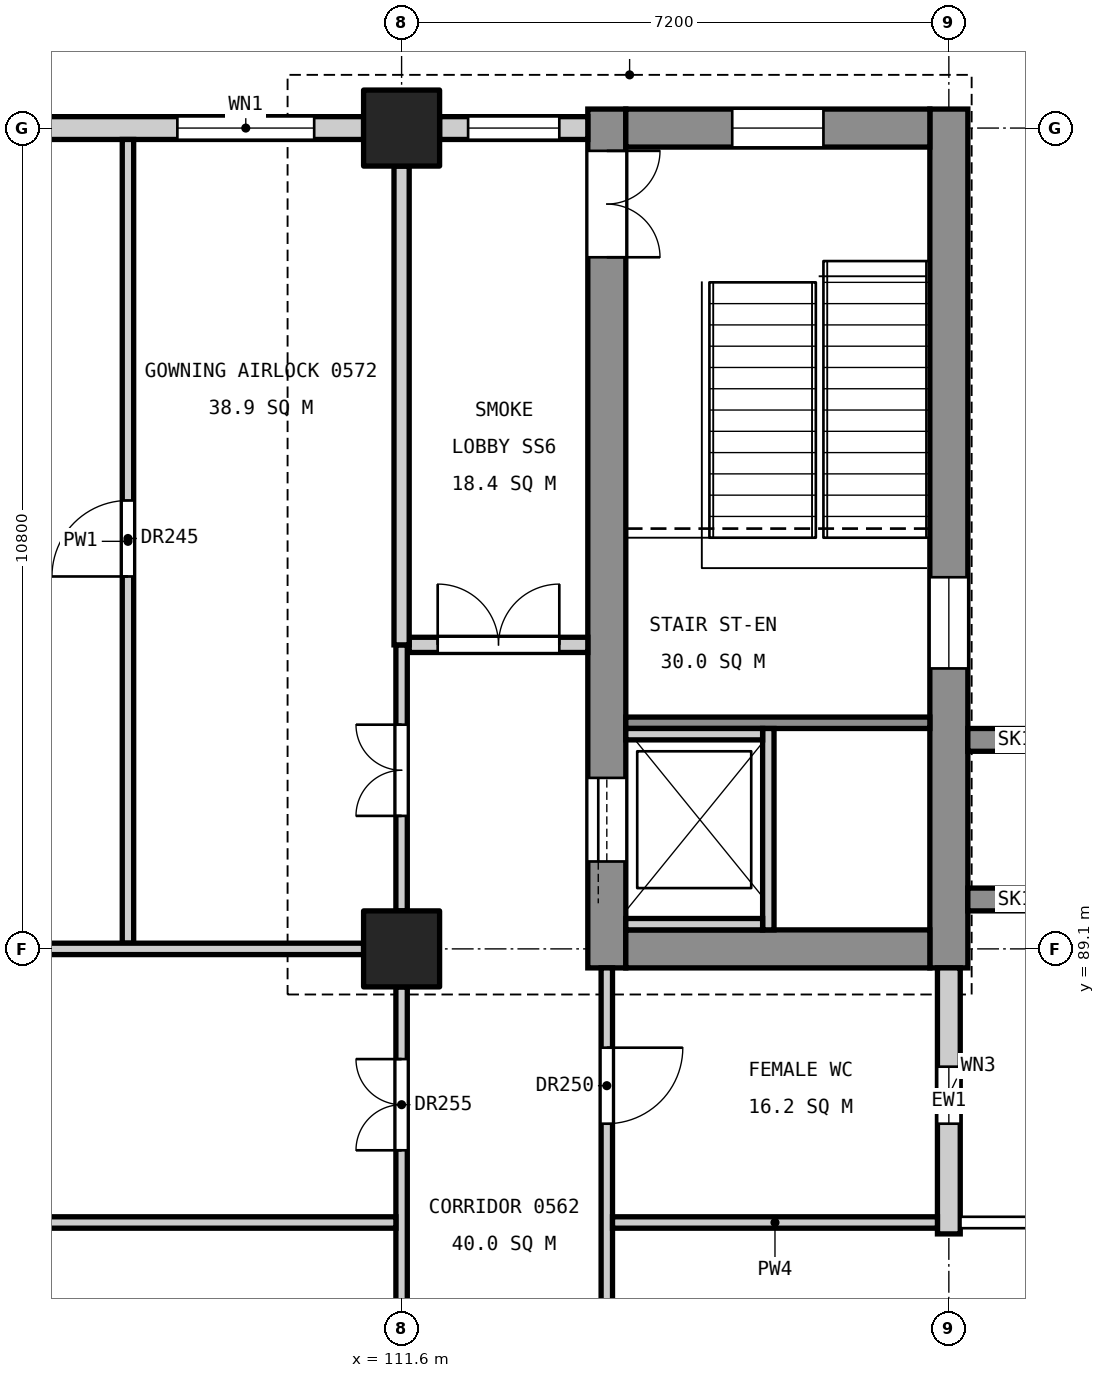
"""IFC4 building model, lengths in metres.
Left out: names, types, materials, properties, quantities, classifications, styles, units other than length and angle.
Written with IfcOpenShell. Run it as: python <this file> out.ifc"""

import sys

from ifc_helpers import new_model, si_unit, direction, frame, frame_2d, origin, origin_2d, place, context, subcontext, project, spatial, rectangle, extrude, element, fill, save


model = new_model("IFC4")
c1 = context("Model", 3, precision=1e-05, world=origin(), true_north=direction((0.0, 1.0)))
c2 = subcontext(c1, "Body", "Model", "MODEL_VIEW")
j1 = project(units=[si_unit("LENGTHUNIT", "METRE"), si_unit("PLANEANGLEUNIT", "RADIAN")], contexts=[c1])
p1 = place(None, origin())
s1 = spatial("IfcSite", under=j1, at=p1, CompositionType="ELEMENT")
p2 = place(p1, origin())
s2 = spatial("IfcBuilding", under=s1, at=p2, CompositionType="ELEMENT")
p3 = place(p2, frame((0.0, 0.0, 27.0)))
s3 = spatial("IfcBuildingStorey", under=s2, at=p3, CompositionType="ELEMENT", Elevation=27.0)
for number, where, z_axis, x_axis in (
    (1, (111.6, 89.1, 0.0), (0.0, 0.0, 1.0), (1.0, 0.0, 0.0)),
    (2, (111.6, 99.9, 0.0), (0.0, 0.0, 1.0), (1.0, 0.0, 0.0)),
):
    element("IfcColumn", number, at=place(p3, frame(where, z_axis=z_axis, x_axis=x_axis)), inside=s3, PredefinedType="COLUMN", context=c2, shape_type="SweptSolid", body=[
        extrude(rectangle(XDim=1.0, YDim=1.0, at=origin_2d()), origin(), (0.0, 0.0, 1.0), 4.8),
    ])
p4 = place(p3, frame((118.8, 88.85, 0.0), z_axis=(0.0, 0.0, 1.0), x_axis=(0.0, 1.0, 0.0)))
e3 = element("IfcWall", 3, at=p4, inside=s3, PredefinedType="SHEAR", context=c2, shape_type="SweptSolid", body=[
    extrude(rectangle(XDim=11.3, YDim=0.5, at=frame_2d((5.65, 0.0))), origin(), (0.0, 0.0, 1.0), 4.55),
])
p5 = place(p4, frame((3.94, 0.0, 3.4)))
e4 = element("IfcOpeningElement", 4, at=p5, cuts=e3, PredefinedType="OPENING", context=c2, shape_type="SweptSolid", body=[
    extrude(rectangle(XDim=1.2, YDim=0.9, at=frame_2d((0.6, 0.45))), frame((0.0, 0.26, 0.0), z_axis=(0.0, -1.0, 0.0), x_axis=(1.0, 0.0, 0.0)), (0.0, 0.0, 1.0), 0.52),
])
p6 = place(p3, frame((114.3, 88.85, 0.0), z_axis=(0.0, 0.0, 1.0), x_axis=(0.0, 1.0, 0.0)))
e5 = element("IfcWall", 5, at=p6, inside=s3, PredefinedType="SHEAR", context=c2, shape_type="SweptSolid", body=[
    extrude(rectangle(XDim=11.3, YDim=0.5, at=frame_2d((5.65, 0.0))), origin(), (0.0, 0.0, 1.0), 4.55),
])
p7 = place(p6, frame((9.35, 0.0, 0.0)))
e6 = element("IfcOpeningElement", 6, at=p7, cuts=e5, PredefinedType="OPENING", context=c2, shape_type="SweptSolid", body=[
    extrude(rectangle(XDim=1.4, YDim=2.1, at=frame_2d((0.7, 1.05))), frame((0.0, 0.26, 0.0), z_axis=(0.0, -1.0, 0.0), x_axis=(1.0, 0.0, 0.0)), (0.0, 0.0, 1.0), 0.52),
])
p8 = place(p6, frame((1.4, 0.0, 0.0)))
e7 = element("IfcOpeningElement", 7, at=p8, cuts=e5, PredefinedType="OPENING", context=c2, shape_type="SweptSolid", body=[
    extrude(rectangle(XDim=1.1, YDim=2.1, at=frame_2d((0.55, 1.05))), frame((0.0, 0.26, 0.0), z_axis=(0.0, -1.0, 0.0), x_axis=(1.0, 0.0, 0.0)), (0.0, 0.0, 1.0), 0.52),
])
p9 = place(p3, frame((118.55, 89.1, 0.0), z_axis=(0.0, 0.0, 1.0), x_axis=(-1.0, 0.0, 0.0)))
e8 = element("IfcWall", 8, at=p9, inside=s3, PredefinedType="SHEAR", context=c2, shape_type="SweptSolid", body=[
    extrude(rectangle(XDim=4.0, YDim=0.5, at=frame_2d((2.0, 0.0))), origin(), (0.0, 0.0, 1.0), 4.55),
])
p10 = place(p3, frame((118.55, 99.9, 0.0), z_axis=(0.0, 0.0, 1.0), x_axis=(-1.0, 0.0, 0.0)))
e9 = element("IfcWall", 9, at=p10, inside=s3, PredefinedType="SHEAR", context=c2, shape_type="SweptSolid", body=[
    extrude(rectangle(XDim=4.0, YDim=0.5, at=frame_2d((2.0, 0.0))), origin(), (0.0, 0.0, 1.0), 4.55),
])
p11 = place(p10, frame((1.4, 0.0, 3.4)))
e10 = element("IfcOpeningElement", 10, at=p11, cuts=e9, PredefinedType="OPENING", context=c2, shape_type="SweptSolid", body=[
    extrude(rectangle(XDim=1.2, YDim=0.9, at=frame_2d((0.6, 0.45))), frame((0.0, 0.26, 0.0), z_axis=(0.0, -1.0, 0.0), x_axis=(1.0, 0.0, 0.0)), (0.0, 0.0, 1.0), 0.52),
])
for number, where, z_axis, x_axis in (
    (11, (119.05, 89.75, 0.0), (0.0, 0.0, 1.0), (1.0, 0.0, 0.0)),
    (12, (119.05, 91.85, 0.0), (0.0, 0.0, 1.0), (1.0, 0.0, 0.0)),
):
    element("IfcWall", number, at=place(p3, frame(where, z_axis=z_axis, x_axis=x_axis)), inside=s3, PredefinedType="SHEAR", context=c2, shape_type="SweptSolid", body=[
        extrude(rectangle(XDim=1.25, YDim=0.3, at=frame_2d((0.625, 0.0))), origin(), (0.0, 0.0, 1.0), 4.8),
    ])
p12 = place(p3, frame((118.55, 92.075, 0.0), z_axis=(0.0, 0.0, 1.0), x_axis=(-1.0, 0.0, 0.0)))
e13 = element("IfcWall", 13, at=p12, inside=s3, PredefinedType="SOLIDWALL", context=c2, shape_type="SweptSolid", body=[
    extrude(rectangle(XDim=4.0, YDim=0.15, at=frame_2d((2.0, 0.0))), origin(), (0.0, 0.0, 1.0), 4.55),
])
p13 = place(p3, frame((116.425, 92.0, 0.0), z_axis=(0.0, 0.0, 1.0), x_axis=(0.0, -1.0, 0.0)))
e14 = element("IfcWall", 14, at=p13, inside=s3, PredefinedType="SOLIDWALL", context=c2, shape_type="SweptSolid", body=[
    extrude(rectangle(XDim=2.65, YDim=0.15, at=frame_2d((1.325, 0.0))), origin(), (0.0, 0.0, 1.0), 4.8),
])
for number, where, z_axis, x_axis in (
    (15, (116.35, 91.925, 0.0), (0.0, 0.0, 1.0), (-1.0, 0.0, 0.0)),
    (16, (116.35, 89.425, 0.0), (0.0, 0.0, 1.0), (-1.0, 0.0, 0.0)),
):
    element("IfcWall", number, at=place(p3, frame(where, z_axis=z_axis, x_axis=x_axis)), inside=s3, PredefinedType="SOLIDWALL", context=c2, shape_type="SweptSolid", body=[
        extrude(rectangle(XDim=1.8, YDim=0.15, at=frame_2d((0.9, 0.0))), origin(), (0.0, 0.0, 1.0), 4.8),
    ])
p14 = place(p3, frame((118.8, 85.35, 0.0), z_axis=(0.0, 0.0, 1.0), x_axis=(0.0, 1.0, 0.0)))
e17 = element("IfcWall", 17, at=p14, inside=s3, PredefinedType="STANDARD", context=c2, shape_type="SweptSolid", body=[
    extrude(rectangle(XDim=3.5, YDim=0.3, at=frame_2d((1.75, 0.0))), origin(), (0.0, 0.0, 1.0), 3.65),
])
p15 = place(p14, frame((1.45, 0.0, 0.8)))
e18 = element("IfcOpeningElement", 18, at=p15, cuts=e17, PredefinedType="OPENING", context=c2, shape_type="SweptSolid", body=[
    extrude(rectangle(XDim=0.75, YDim=1.2, at=frame_2d((0.375, 0.6))), frame((0.0, 0.16, 0.0), z_axis=(0.0, -1.0, 0.0), x_axis=(1.0, 0.0, 0.0)), (0.0, 0.0, 1.0), 0.32),
])
p16 = place(p3, frame((114.05, 99.9, 0.0), z_axis=(0.0, 0.0, 1.0), x_axis=(-1.0, 0.0, 0.0)))
e19 = element("IfcWall", 19, at=p16, inside=s3, PredefinedType="STANDARD", context=c2, shape_type="SweptSolid", body=[
    extrude(rectangle(XDim=1.95, YDim=0.3, at=frame_2d((0.975, 0.0))), origin(), (0.0, 0.0, 1.0), 3.85),
])
p17 = place(p16, frame((0.375, 0.0, 0.9)))
e20 = element("IfcOpeningElement", 20, at=p17, cuts=e19, PredefinedType="OPENING", context=c2, shape_type="SweptSolid", body=[
    extrude(rectangle(XDim=1.2, YDim=2.4, at=frame_2d((0.6, 1.2))), frame((0.0, 0.16, 0.0), z_axis=(0.0, -1.0, 0.0), x_axis=(1.0, 0.0, 0.0)), (0.0, 0.0, 1.0), 0.32),
])
p18 = place(p3, frame((111.1, 99.9, 0.0), z_axis=(0.0, 0.0, 1.0), x_axis=(-1.0, 0.0, 0.0)))
e21 = element("IfcWall", 21, at=p18, inside=s3, PredefinedType="STANDARD", context=c2, shape_type="SweptSolid", body=[
    extrude(rectangle(XDim=9.8, YDim=0.3, at=frame_2d((4.9, 0.0))), origin(), (0.0, 0.0, 1.0), 3.85),
])
p19 = place(p18, frame((0.65, 0.0, 0.9)))
e22 = element("IfcOpeningElement", 22, at=p19, cuts=e21, PredefinedType="OPENING", context=c2, shape_type="SweptSolid", body=[
    extrude(rectangle(XDim=1.8, YDim=2.4, at=frame_2d((0.9, 1.2))), frame((0.0, 0.16, 0.0), z_axis=(0.0, -1.0, 0.0), x_axis=(1.0, 0.0, 0.0)), (0.0, 0.0, 1.0), 0.32),
])
p20 = place(p18, frame((4.525, 0.0, 0.8)))
e23 = element("IfcOpeningElement", 23, at=p20, cuts=e21, PredefinedType="OPENING", context=c2, shape_type="SweptSolid", body=[
    extrude(rectangle(XDim=0.75, YDim=1.2, at=frame_2d((0.375, 0.6))), frame((0.0, 0.16, 0.0), z_axis=(0.0, -1.0, 0.0), x_axis=(1.0, 0.0, 0.0)), (0.0, 0.0, 1.0), 0.32),
])
p21 = place(p18, frame((7.35, 0.0, 0.9)))
e24 = element("IfcOpeningElement", 24, at=p21, cuts=e21, PredefinedType="OPENING", context=c2, shape_type="SweptSolid", body=[
    extrude(rectangle(XDim=1.8, YDim=2.4, at=frame_2d((0.9, 1.2))), frame((0.0, 0.16, 0.0), z_axis=(0.0, -1.0, 0.0), x_axis=(1.0, 0.0, 0.0)), (0.0, 0.0, 1.0), 0.32),
])
p22 = place(p3, frame((114.3, 78.45, 0.0), z_axis=(0.0, 0.0, 1.0), x_axis=(0.0, 1.0, 0.0)))
e25 = element("IfcWall", 25, at=p22, inside=s3, PredefinedType="PARTITIONING", context=c2, shape_type="SweptSolid", body=[
    extrude(rectangle(XDim=10.4, YDim=0.15, at=frame_2d((5.2, 0.0))), origin(), (0.0, 0.0, 1.0), 3.55),
])
p23 = place(p22, frame((8.35, 0.0, 0.0)))
e26 = element("IfcOpeningElement", 26, at=p23, cuts=e25, PredefinedType="OPENING", context=c2, shape_type="SweptSolid", body=[
    extrude(rectangle(XDim=1.0, YDim=2.1, at=frame_2d((0.5, 1.05))), frame((0.0, 0.085, 0.0), z_axis=(0.0, -1.0, 0.0), x_axis=(1.0, 0.0, 0.0)), (0.0, 0.0, 1.0), 0.17),
])
p24 = place(p22, frame((2.95, 0.0, 0.0)))
e27 = element("IfcOpeningElement", 27, at=p24, cuts=e25, PredefinedType="OPENING", context=c2, shape_type="SweptSolid", body=[
    extrude(rectangle(XDim=1.0, YDim=2.1, at=frame_2d((0.5, 1.05))), frame((0.0, 0.085, 0.0), z_axis=(0.0, -1.0, 0.0), x_axis=(1.0, 0.0, 0.0)), (0.0, 0.0, 1.0), 0.17),
])
p25 = place(p3, frame((118.65, 85.5, 0.0), z_axis=(0.0, 0.0, 1.0), x_axis=(-1.0, 0.0, 0.0)))
e28 = element("IfcWall", 28, at=p25, inside=s3, PredefinedType="PARTITIONING", context=c2, shape_type="SweptSolid", body=[
    extrude(rectangle(XDim=4.275, YDim=0.15, at=frame_2d((2.137, 0.0))), origin(), (0.0, 0.0, 1.0), 3.85),
])
p26 = place(p3, frame((114.05, 93.1, 0.0), z_axis=(0.0, 0.0, 1.0), x_axis=(-1.0, 0.0, 0.0)))
e29 = element("IfcWall", 29, at=p26, inside=s3, PredefinedType="PARTITIONING", context=c2, shape_type="SweptSolid", body=[
    extrude(rectangle(XDim=2.35, YDim=0.2, at=frame_2d((1.175, 0.0))), origin(), (0.0, 0.0, 1.0), 3.55),
])
p27 = place(p26, frame((0.375, 0.0, 0.0)))
e30 = element("IfcOpeningElement", 30, at=p27, cuts=e29, PredefinedType="OPENING", context=c2, shape_type="SweptSolid", body=[
    extrude(rectangle(XDim=1.6, YDim=2.1, at=frame_2d((0.8, 1.05))), frame((0.0, 0.11, 0.0), z_axis=(0.0, -1.0, 0.0), x_axis=(1.0, 0.0, 0.0)), (0.0, 0.0, 1.0), 0.22),
])
p28 = place(p3, frame((111.6, 78.8, 0.0), z_axis=(0.0, 0.0, 1.0), x_axis=(0.0, 1.0, 0.0)))
e31 = element("IfcWall", 31, at=p28, inside=s3, PredefinedType="PARTITIONING", context=c2, shape_type="SweptSolid", body=[
    extrude(rectangle(XDim=9.8, YDim=0.15, at=frame_2d((4.9, 0.0))), origin(), (0.0, 0.0, 1.0), 3.55),
])
p29 = place(p28, frame((4.3, 0.0, 0.0)))
e32 = element("IfcOpeningElement", 32, at=p29, cuts=e31, PredefinedType="OPENING", context=c2, shape_type="SweptSolid", body=[
    extrude(rectangle(XDim=1.2, YDim=2.1, at=frame_2d((0.6, 1.05))), frame((0.0, 0.085, 0.0), z_axis=(0.0, -1.0, 0.0), x_axis=(1.0, 0.0, 0.0)), (0.0, 0.0, 1.0), 0.17),
])
p30 = place(p28, frame((0.95, 0.0, 0.0)))
e33 = element("IfcOpeningElement", 33, at=p30, cuts=e31, PredefinedType="OPENING", context=c2, shape_type="SweptSolid", body=[
    extrude(rectangle(XDim=1.2, YDim=2.1, at=frame_2d((0.6, 1.05))), frame((0.0, 0.085, 0.0), z_axis=(0.0, -1.0, 0.0), x_axis=(1.0, 0.0, 0.0)), (0.0, 0.0, 1.0), 0.17),
])
p31 = place(p28, frame((7.65, 0.0, 0.0)))
e34 = element("IfcOpeningElement", 34, at=p31, cuts=e31, PredefinedType="OPENING", context=c2, shape_type="SweptSolid", body=[
    extrude(rectangle(XDim=1.2, YDim=2.1, at=frame_2d((0.6, 1.05))), frame((0.0, 0.085, 0.0), z_axis=(0.0, -1.0, 0.0), x_axis=(1.0, 0.0, 0.0)), (0.0, 0.0, 1.0), 0.17),
])
p32 = place(p3, frame((111.6, 89.6, 0.0), z_axis=(0.0, 0.0, 1.0), x_axis=(0.0, 1.0, 0.0)))
e35 = element("IfcWall", 35, at=p32, inside=s3, PredefinedType="PARTITIONING", context=c2, shape_type="SweptSolid", body=[
    extrude(rectangle(XDim=3.5, YDim=0.15, at=frame_2d((1.75, 0.0))), origin(), (0.0, 0.0, 1.0), 3.55),
])
p33 = place(p32, frame((1.25, 0.0, 0.0)))
e36 = element("IfcOpeningElement", 36, at=p33, cuts=e35, PredefinedType="OPENING", context=c2, shape_type="SweptSolid", body=[
    extrude(rectangle(XDim=1.2, YDim=2.1, at=frame_2d((0.6, 1.05))), frame((0.0, 0.085, 0.0), z_axis=(0.0, -1.0, 0.0), x_axis=(1.0, 0.0, 0.0)), (0.0, 0.0, 1.0), 0.17),
])
p34 = place(p3, frame((111.6, 93.1, 0.0), z_axis=(0.0, 0.0, 1.0), x_axis=(0.0, 1.0, 0.0)))
e37 = element("IfcWall", 37, at=p34, inside=s3, PredefinedType="PARTITIONING", context=c2, shape_type="SweptSolid", body=[
    extrude(rectangle(XDim=6.3, YDim=0.2, at=frame_2d((3.15, 0.0))), origin(), (0.0, 0.0, 1.0), 3.55),
])
p35 = place(p3, frame((108.0, 89.175, 0.0), z_axis=(0.0, 0.0, 1.0), x_axis=(0.0, 1.0, 0.0)))
e38 = element("IfcWall", 38, at=p35, inside=s3, PredefinedType="PARTITIONING", context=c2, shape_type="SweptSolid", body=[
    extrude(rectangle(XDim=10.575, YDim=0.15, at=frame_2d((5.288, 0.0))), origin(), (0.0, 0.0, 1.0), 3.55),
])
p36 = place(p35, frame((4.825, 0.0, 0.0)))
e39 = element("IfcOpeningElement", 39, at=p36, cuts=e38, PredefinedType="OPENING", context=c2, shape_type="SweptSolid", body=[
    extrude(rectangle(XDim=1.0, YDim=2.1, at=frame_2d((0.5, 1.05))), frame((0.0, 0.085, 0.0), z_axis=(0.0, -1.0, 0.0), x_axis=(1.0, 0.0, 0.0)), (0.0, 0.0, 1.0), 0.17),
])
p37 = place(p3, frame((111.525, 85.5, 0.0), z_axis=(0.0, 0.0, 1.0), x_axis=(-1.0, 0.0, 0.0)))
e40 = element("IfcWall", 40, at=p37, inside=s3, PredefinedType="PARTITIONING", context=c2, shape_type="SweptSolid", body=[
    extrude(rectangle(XDim=10.575, YDim=0.15, at=frame_2d((5.288, 0.0))), origin(), (0.0, 0.0, 1.0), 3.85),
])
p38 = place(p3, frame((111.1, 89.1, 0.0), z_axis=(0.0, 0.0, 1.0), x_axis=(-1.0, 0.0, 0.0)))
e41 = element("IfcWall", 41, at=p38, inside=s3, PredefinedType="PARTITIONING", context=c2, shape_type="SweptSolid", body=[
    extrude(rectangle(XDim=9.8, YDim=0.15, at=frame_2d((4.9, 0.0))), origin(), (0.0, 0.0, 1.0), 3.85),
])
p39 = place(p7, frame((1.4, 0.0, 0.0), z_axis=(0.0, 0.0, 1.0), x_axis=(-1.0, 0.0, 0.0)))
e42 = element("IfcDoor", 42, at=p39, inside=s3, OperationType="DOUBLE_DOOR_SINGLE_SWING", PredefinedType="DOOR", context=c2, shape_type="SweptSolid", body=[
    extrude(rectangle(XDim=1.4, YDim=2.1, at=frame_2d((0.7, 1.05))), frame((0.0, 0.025, 0.0), z_axis=(0.0, -1.0, 0.0), x_axis=(1.0, 0.0, 0.0)), (0.0, 0.0, 1.0), 0.05),
])
fill(e6, e42)
p40 = place(p8, origin())
e43 = element("IfcDoor", 43, at=p40, inside=s3, OperationType="SLIDING_TO_LEFT", PredefinedType="DOOR", context=c2, shape_type="SweptSolid", body=[
    extrude(rectangle(XDim=1.1, YDim=2.1, at=frame_2d((0.55, 1.05))), frame((0.0, 0.025, 0.0), z_axis=(0.0, -1.0, 0.0), x_axis=(1.0, 0.0, 0.0)), (0.0, 0.0, 1.0), 0.05),
])
fill(e7, e43)
p41 = place(p15, origin())
e44 = element("IfcWindow", 44, at=p41, inside=s3, PartitioningType="SINGLE_PANEL", PredefinedType="WINDOW", context=c2, shape_type="SweptSolid", body=[
    extrude(rectangle(XDim=0.75, YDim=1.2, at=frame_2d((0.375, 0.6))), frame((0.0, 0.03, 0.0), z_axis=(0.0, -1.0, 0.0), x_axis=(1.0, 0.0, 0.0)), (0.0, 0.0, 1.0), 0.06),
])
fill(e18, e44)
p42 = place(p17, origin())
e45 = element("IfcWindow", 45, at=p42, inside=s3, PartitioningType="SINGLE_PANEL", PredefinedType="WINDOW", context=c2, shape_type="SweptSolid", body=[
    extrude(rectangle(XDim=1.2, YDim=2.4, at=frame_2d((0.6, 1.2))), frame((0.0, 0.03, 0.0), z_axis=(0.0, -1.0, 0.0), x_axis=(1.0, 0.0, 0.0)), (0.0, 0.0, 1.0), 0.06),
])
fill(e20, e45)
p43 = place(p19, origin())
e46 = element("IfcWindow", 46, at=p43, inside=s3, PartitioningType="SINGLE_PANEL", PredefinedType="WINDOW", context=c2, shape_type="SweptSolid", body=[
    extrude(rectangle(XDim=1.8, YDim=2.4, at=frame_2d((0.9, 1.2))), frame((0.0, 0.03, 0.0), z_axis=(0.0, -1.0, 0.0), x_axis=(1.0, 0.0, 0.0)), (0.0, 0.0, 1.0), 0.06),
])
fill(e22, e46)
p44 = place(p5, origin())
e47 = element("IfcWindow", 47, at=p44, inside=s3, PartitioningType="SINGLE_PANEL", PredefinedType="WINDOW", context=c2, shape_type="SweptSolid", body=[
    extrude(rectangle(XDim=1.2, YDim=0.9, at=frame_2d((0.6, 0.45))), frame((0.0, 0.03, 0.0), z_axis=(0.0, -1.0, 0.0), x_axis=(1.0, 0.0, 0.0)), (0.0, 0.0, 1.0), 0.06),
])
fill(e4, e47)
p45 = place(p11, origin())
e48 = element("IfcWindow", 48, at=p45, inside=s3, PartitioningType="SINGLE_PANEL", PredefinedType="WINDOW", context=c2, shape_type="SweptSolid", body=[
    extrude(rectangle(XDim=1.2, YDim=0.9, at=frame_2d((0.6, 0.45))), frame((0.0, 0.03, 0.0), z_axis=(0.0, -1.0, 0.0), x_axis=(1.0, 0.0, 0.0)), (0.0, 0.0, 1.0), 0.06),
])
fill(e10, e48)
p46 = place(p36, origin())
e49 = element("IfcDoor", 49, at=p46, inside=s3, OperationType="SINGLE_SWING_LEFT", PredefinedType="DOOR", context=c2, shape_type="SweptSolid", body=[
    extrude(rectangle(XDim=1.0, YDim=2.1, at=frame_2d((0.5, 1.05))), frame((0.0, 0.025, 0.0), z_axis=(0.0, -1.0, 0.0), x_axis=(1.0, 0.0, 0.0)), (0.0, 0.0, 1.0), 0.05),
])
fill(e39, e49)
p47 = place(p23, frame((1.0, 0.0, 0.0), z_axis=(0.0, 0.0, 1.0), x_axis=(-1.0, 0.0, 0.0)))
e50 = element("IfcDoor", 50, at=p47, inside=s3, OperationType="SINGLE_SWING_LEFT", PredefinedType="DOOR", context=c2, shape_type="SweptSolid", body=[
    extrude(rectangle(XDim=1.0, YDim=2.1, at=frame_2d((0.5, 1.05))), frame((0.0, 0.025, 0.0), z_axis=(0.0, -1.0, 0.0), x_axis=(1.0, 0.0, 0.0)), (0.0, 0.0, 1.0), 0.05),
])
fill(e26, e50)
p48 = place(p33, origin())
e51 = element("IfcDoor", 51, at=p48, inside=s3, OperationType="DOUBLE_DOOR_SINGLE_SWING", PredefinedType="DOOR", context=c2, shape_type="SweptSolid", body=[
    extrude(rectangle(XDim=1.2, YDim=2.1, at=frame_2d((0.6, 1.05))), frame((0.0, 0.025, 0.0), z_axis=(0.0, -1.0, 0.0), x_axis=(1.0, 0.0, 0.0)), (0.0, 0.0, 1.0), 0.05),
])
fill(e36, e51)
p49 = place(p31, origin())
e52 = element("IfcDoor", 52, at=p49, inside=s3, OperationType="DOUBLE_DOOR_SINGLE_SWING", PredefinedType="DOOR", context=c2, shape_type="SweptSolid", body=[
    extrude(rectangle(XDim=1.2, YDim=2.1, at=frame_2d((0.6, 1.05))), frame((0.0, 0.025, 0.0), z_axis=(0.0, -1.0, 0.0), x_axis=(1.0, 0.0, 0.0)), (0.0, 0.0, 1.0), 0.05),
])
fill(e34, e52)
p50 = place(p27, frame((1.6, 0.0, 0.0), z_axis=(0.0, 0.0, 1.0), x_axis=(-1.0, 0.0, 0.0)))
e53 = element("IfcDoor", 53, at=p50, inside=s3, OperationType="DOUBLE_DOOR_SINGLE_SWING", PredefinedType="DOOR", context=c2, shape_type="SweptSolid", body=[
    extrude(rectangle(XDim=1.6, YDim=2.1, at=frame_2d((0.8, 1.05))), frame((0.0, 0.025, 0.0), z_axis=(0.0, -1.0, 0.0), x_axis=(1.0, 0.0, 0.0)), (0.0, 0.0, 1.0), 0.05),
])
fill(e30, e53)
save(model, sys.argv[1])
